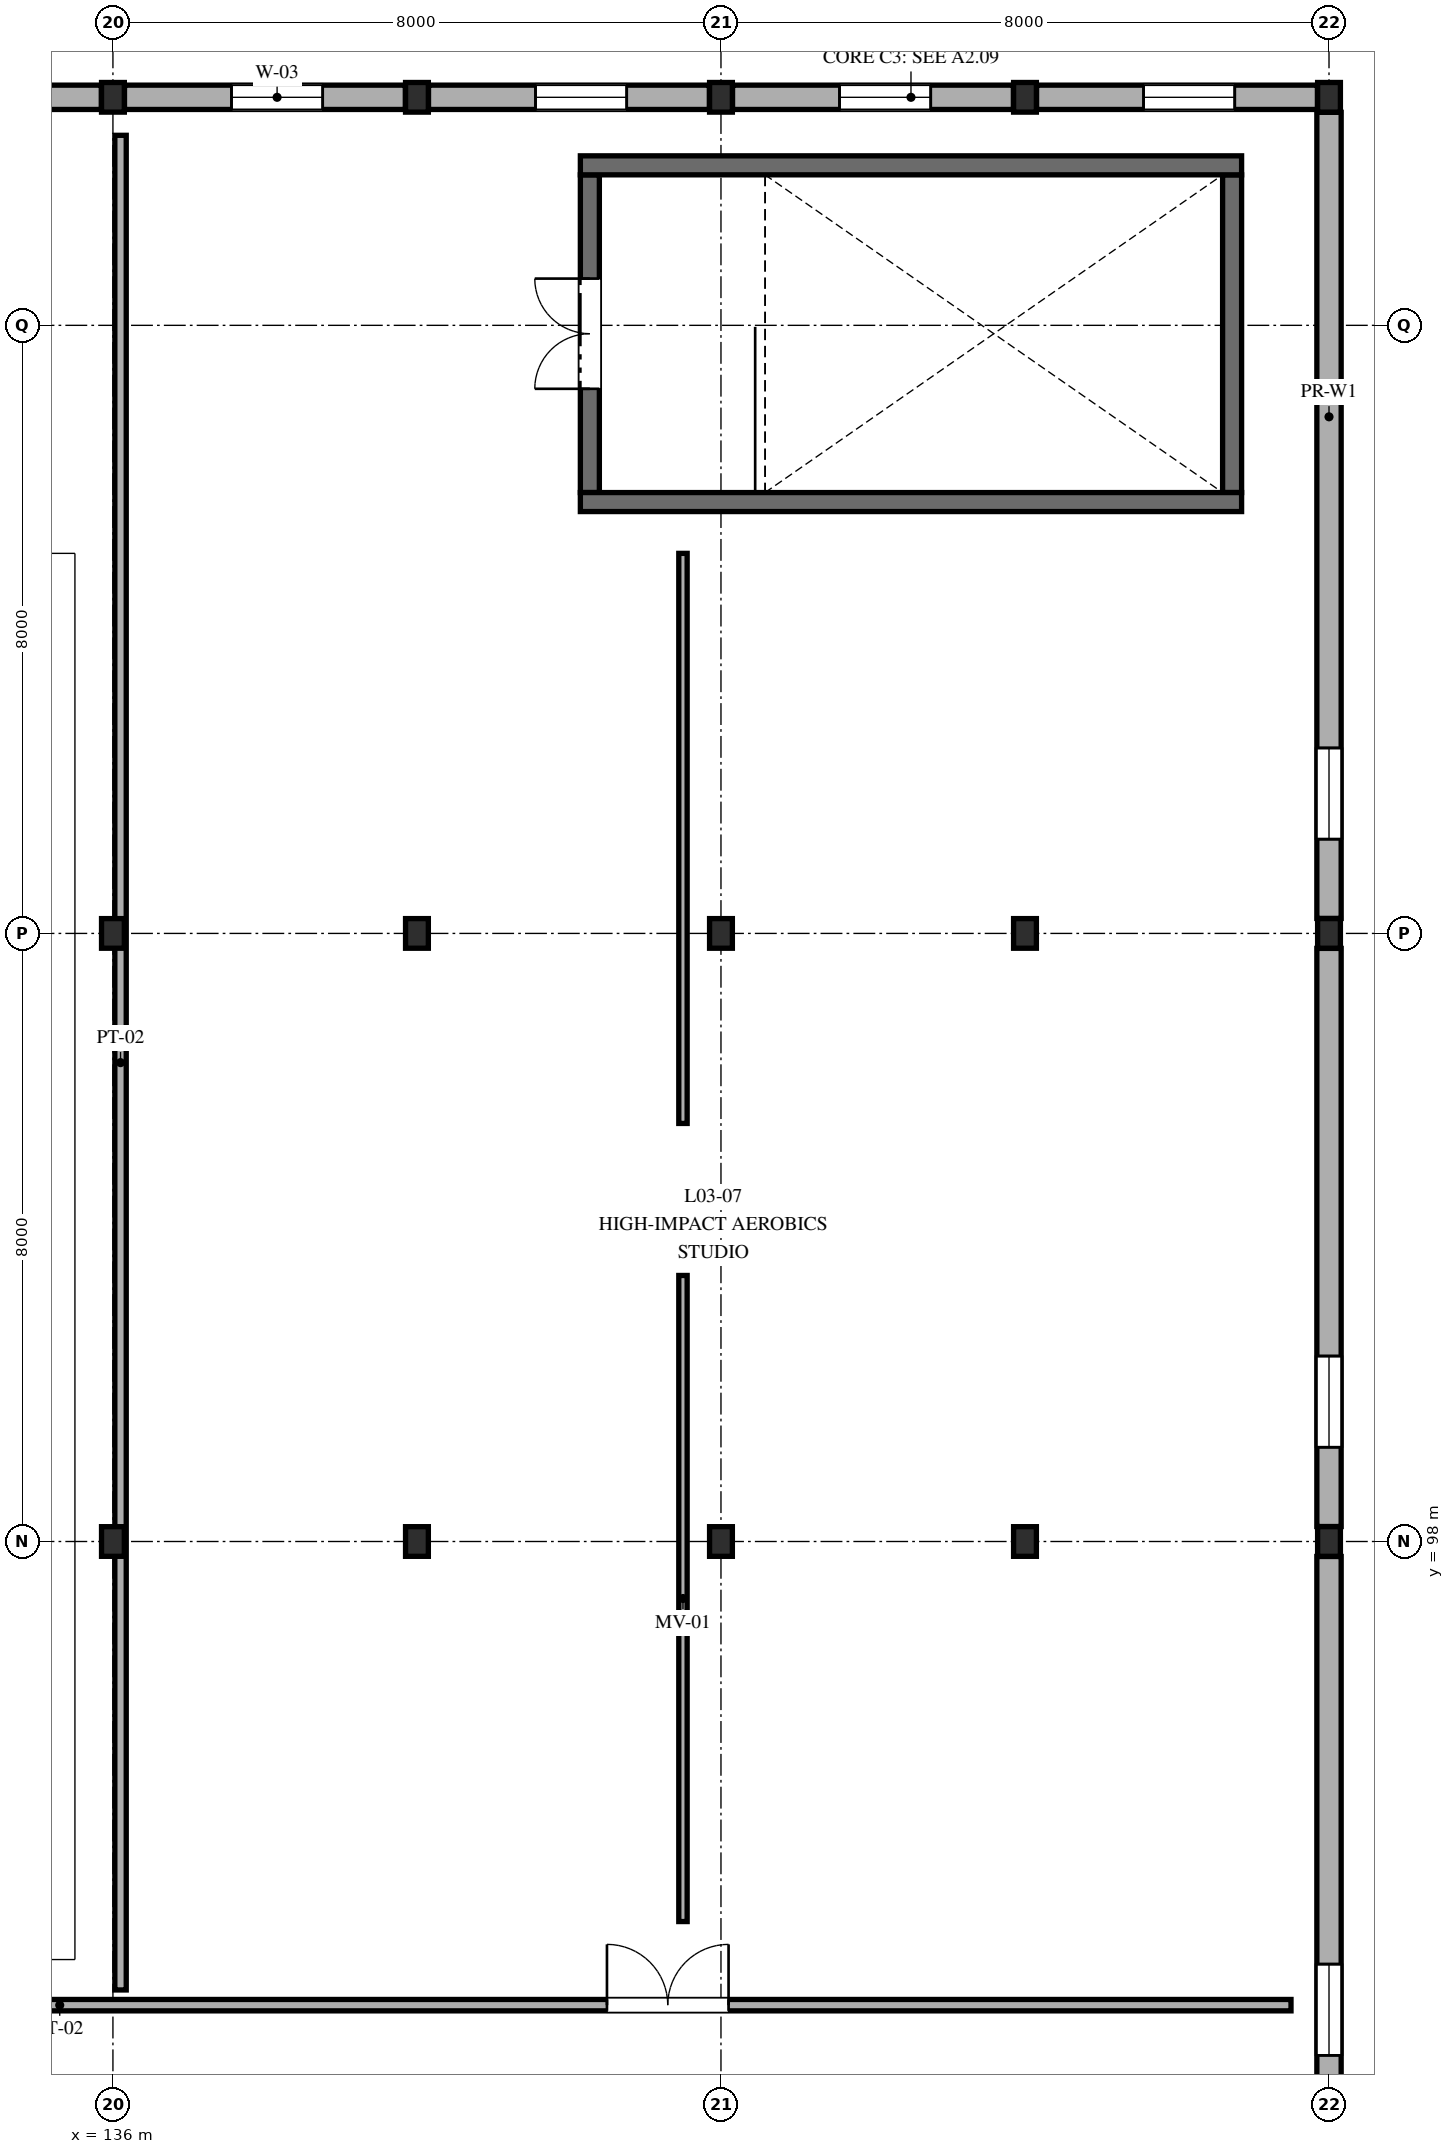
"""IFC4 building model, lengths in metres.
Left out: names, types, materials, properties, quantities, classifications, styles, units other than length and angle.
Written with IfcOpenShell. Run it as: python <this file> out.ifc"""

import sys

from ifc_helpers import new_model, si_unit, direction, frame, frame_2d, origin, origin_2d, place, context, subcontext, project, spatial, rectangle, i_section, extrude, element, fill, save


model = new_model("IFC4")
c1 = context("Model", 3, precision=1e-05, world=origin(), true_north=direction((0.0, 1.0)))
c2 = subcontext(c1, "Body", "Model", "MODEL_VIEW")
j1 = project(units=[si_unit("LENGTHUNIT", "METRE"), si_unit("PLANEANGLEUNIT", "RADIAN")], contexts=[c1])
p1 = place(None, origin())
s1 = spatial("IfcSite", under=j1, at=p1, CompositionType="ELEMENT")
p2 = place(p1, origin())
s2 = spatial("IfcBuilding", under=s1, at=p2, CompositionType="ELEMENT")
p3 = place(p2, frame((0.0, 0.0, 14.0)))
s3 = spatial("IfcBuildingStorey", under=s2, at=p3, CompositionType="ELEMENT", Elevation=14.0)
for number, where, z_axis, x_axis in (
    (1, (136.0, 98.0, 0.0), (0.0, 0.0, 1.0), (1.0, 0.0, 0.0)),
    (2, (136.0, 106.0, 0.0), (0.0, 0.0, 1.0), (1.0, 0.0, 0.0)),
    (3, (136.0, 117.0, 0.0), (0.0, 0.0, 1.0), (1.0, 0.0, 0.0)),
    (4, (140.0, 98.0, 0.0), (0.0, 0.0, 1.0), (1.0, 0.0, 0.0)),
    (5, (140.0, 106.0, 0.0), (0.0, 0.0, 1.0), (1.0, 0.0, 0.0)),
    (6, (140.0, 117.0, 0.0), (0.0, 0.0, 1.0), (1.0, 0.0, 0.0)),
    (7, (144.0, 98.0, 0.0), (0.0, 0.0, 1.0), (1.0, 0.0, 0.0)),
    (8, (144.0, 106.0, 0.0), (0.0, 0.0, 1.0), (1.0, 0.0, 0.0)),
    (9, (144.0, 117.0, 0.0), (0.0, 0.0, 1.0), (1.0, 0.0, 0.0)),
    (10, (148.0, 98.0, 0.0), (0.0, 0.0, 1.0), (1.0, 0.0, 0.0)),
    (11, (148.0, 106.0, 0.0), (0.0, 0.0, 1.0), (1.0, 0.0, 0.0)),
    (12, (148.0, 117.0, 0.0), (0.0, 0.0, 1.0), (1.0, 0.0, 0.0)),
    (13, (152.0, 98.0, 0.0), (0.0, 0.0, 1.0), (1.0, 0.0, 0.0)),
    (14, (152.0, 106.0, 0.0), (0.0, 0.0, 1.0), (1.0, 0.0, 0.0)),
    (15, (152.0, 117.0, 0.0), (0.0, 0.0, 1.0), (1.0, 0.0, 0.0)),
):
    element("IfcColumn", number, at=place(p3, frame(where, z_axis=z_axis, x_axis=x_axis)), inside=s3, PredefinedType="COLUMN", context=c2, shape_type="SweptSolid", body=[
        extrude(i_section(OverallWidth=0.3, OverallDepth=0.39, WebThickness=0.011, FlangeThickness=0.019, FilletRadius=0.027, at=origin_2d()), origin(), (0.0, 0.0, 1.0), 4.6),
    ])
p4 = place(p3, frame((135.848, 117.0, 0.0), z_axis=(0.0, 0.0, 1.0), x_axis=(-1.0, 0.0, 0.0)))
e16 = element("IfcWall", 16, at=p4, inside=s3, PredefinedType="STANDARD", context=c2, shape_type="SweptSolid", body=[
    extrude(rectangle(XDim=3.696, YDim=0.32, at=frame_2d((1.848, 0.0))), origin(), (0.0, 0.0, 1.0), 3.955),
])
p5 = place(p4, frame((1.088, 0.0, 0.95)))
e17 = element("IfcOpeningElement", 17, at=p5, cuts=e16, PredefinedType="OPENING", context=c2, shape_type="SweptSolid", body=[
    extrude(rectangle(XDim=1.2, YDim=1.5, at=frame_2d((0.6, 0.75))), frame((0.0, 0.17, 0.0), z_axis=(0.0, -1.0, 0.0), x_axis=(1.0, 0.0, 0.0)), (0.0, 0.0, 1.0), 0.34),
])
p6 = place(p3, frame((139.848, 117.0, 0.0), z_axis=(0.0, 0.0, 1.0), x_axis=(-1.0, 0.0, 0.0)))
e18 = element("IfcWall", 18, at=p6, inside=s3, PredefinedType="STANDARD", context=c2, shape_type="SweptSolid", body=[
    extrude(rectangle(XDim=3.696, YDim=0.32, at=frame_2d((1.848, 0.0))), origin(), (0.0, 0.0, 1.0), 3.955),
])
p7 = place(p6, frame((1.088, 0.0, 0.95)))
e19 = element("IfcOpeningElement", 19, at=p7, cuts=e18, PredefinedType="OPENING", context=c2, shape_type="SweptSolid", body=[
    extrude(rectangle(XDim=1.2, YDim=1.5, at=frame_2d((0.6, 0.75))), frame((0.0, 0.17, 0.0), z_axis=(0.0, -1.0, 0.0), x_axis=(1.0, 0.0, 0.0)), (0.0, 0.0, 1.0), 0.34),
])
p8 = place(p3, frame((143.848, 117.0, 0.0), z_axis=(0.0, 0.0, 1.0), x_axis=(-1.0, 0.0, 0.0)))
e20 = element("IfcWall", 20, at=p8, inside=s3, PredefinedType="STANDARD", context=c2, shape_type="SweptSolid", body=[
    extrude(rectangle(XDim=3.696, YDim=0.32, at=frame_2d((1.848, 0.0))), origin(), (0.0, 0.0, 1.0), 3.955),
])
p9 = place(p8, frame((1.088, 0.0, 0.95)))
e21 = element("IfcOpeningElement", 21, at=p9, cuts=e20, PredefinedType="OPENING", context=c2, shape_type="SweptSolid", body=[
    extrude(rectangle(XDim=1.2, YDim=1.5, at=frame_2d((0.6, 0.75))), frame((0.0, 0.17, 0.0), z_axis=(0.0, -1.0, 0.0), x_axis=(1.0, 0.0, 0.0)), (0.0, 0.0, 1.0), 0.34),
])
p10 = place(p3, frame((147.848, 117.0, 0.0), z_axis=(0.0, 0.0, 1.0), x_axis=(-1.0, 0.0, 0.0)))
e22 = element("IfcWall", 22, at=p10, inside=s3, PredefinedType="STANDARD", context=c2, shape_type="SweptSolid", body=[
    extrude(rectangle(XDim=3.696, YDim=0.32, at=frame_2d((1.848, 0.0))), origin(), (0.0, 0.0, 1.0), 3.955),
])
p11 = place(p10, frame((1.088, 0.0, 0.95)))
e23 = element("IfcOpeningElement", 23, at=p11, cuts=e22, PredefinedType="OPENING", context=c2, shape_type="SweptSolid", body=[
    extrude(rectangle(XDim=1.2, YDim=1.5, at=frame_2d((0.6, 0.75))), frame((0.0, 0.17, 0.0), z_axis=(0.0, -1.0, 0.0), x_axis=(1.0, 0.0, 0.0)), (0.0, 0.0, 1.0), 0.34),
])
p12 = place(p3, frame((151.848, 117.0, 0.0), z_axis=(0.0, 0.0, 1.0), x_axis=(-1.0, 0.0, 0.0)))
e24 = element("IfcWall", 24, at=p12, inside=s3, PredefinedType="STANDARD", context=c2, shape_type="SweptSolid", body=[
    extrude(rectangle(XDim=3.696, YDim=0.32, at=frame_2d((1.848, 0.0))), origin(), (0.0, 0.0, 1.0), 3.955),
])
p13 = place(p12, frame((1.088, 0.0, 0.95)))
e25 = element("IfcOpeningElement", 25, at=p13, cuts=e24, PredefinedType="OPENING", context=c2, shape_type="SweptSolid", body=[
    extrude(rectangle(XDim=1.2, YDim=1.5, at=frame_2d((0.6, 0.75))), frame((0.0, 0.17, 0.0), z_axis=(0.0, -1.0, 0.0), x_axis=(1.0, 0.0, 0.0)), (0.0, 0.0, 1.0), 0.34),
])
p14 = place(p3, frame((152.0, 90.197, 0.0), z_axis=(0.0, 0.0, 1.0), x_axis=(0.0, 1.0, 0.0)))
e26 = element("IfcWall", 26, at=p14, inside=s3, PredefinedType="STANDARD", context=c2, shape_type="SweptSolid", body=[
    extrude(rectangle(XDim=7.606, YDim=0.32, at=frame_2d((3.803, 0.0))), origin(), (0.0, 0.0, 1.0), 4.005),
])
p15 = place(p14, frame((1.043, 0.0, 0.95)))
e27 = element("IfcOpeningElement", 27, at=p15, cuts=e26, PredefinedType="OPENING", context=c2, shape_type="SweptSolid", body=[
    extrude(rectangle(XDim=1.2, YDim=1.5, at=frame_2d((0.6, 0.75))), frame((0.0, 0.17, 0.0), z_axis=(0.0, -1.0, 0.0), x_axis=(1.0, 0.0, 0.0)), (0.0, 0.0, 1.0), 0.34),
])
p16 = place(p3, frame((152.0, 98.197, 0.0), z_axis=(0.0, 0.0, 1.0), x_axis=(0.0, 1.0, 0.0)))
e28 = element("IfcWall", 28, at=p16, inside=s3, PredefinedType="STANDARD", context=c2, shape_type="SweptSolid", body=[
    extrude(rectangle(XDim=7.606, YDim=0.32, at=frame_2d((3.803, 0.0))), origin(), (0.0, 0.0, 1.0), 4.005),
])
p17 = place(p16, frame((1.043, 0.0, 0.95)))
e29 = element("IfcOpeningElement", 29, at=p17, cuts=e28, PredefinedType="OPENING", context=c2, shape_type="SweptSolid", body=[
    extrude(rectangle(XDim=1.2, YDim=1.5, at=frame_2d((0.6, 0.75))), frame((0.0, 0.17, 0.0), z_axis=(0.0, -1.0, 0.0), x_axis=(1.0, 0.0, 0.0)), (0.0, 0.0, 1.0), 0.34),
])
p18 = place(p3, frame((152.0, 106.197, 0.0), z_axis=(0.0, 0.0, 1.0), x_axis=(0.0, 1.0, 0.0)))
e30 = element("IfcWall", 30, at=p18, inside=s3, PredefinedType="STANDARD", context=c2, shape_type="SweptSolid", body=[
    extrude(rectangle(XDim=10.606, YDim=0.32, at=frame_2d((5.303, 0.0))), origin(), (0.0, 0.0, 1.0), 4.005),
])
p19 = place(p18, frame((1.043, 0.0, 0.95)))
e31 = element("IfcOpeningElement", 31, at=p19, cuts=e30, PredefinedType="OPENING", context=c2, shape_type="SweptSolid", body=[
    extrude(rectangle(XDim=1.2, YDim=1.5, at=frame_2d((0.6, 0.75))), frame((0.0, 0.17, 0.0), z_axis=(0.0, -1.0, 0.0), x_axis=(1.0, 0.0, 0.0)), (0.0, 0.0, 1.0), 0.34),
])
p20 = place(p3, frame((142.275, 111.8, 0.0), z_axis=(0.0, 0.0, 1.0), x_axis=(0.0, 1.0, 0.0)))
e32 = element("IfcWall", 32, at=p20, inside=s3, PredefinedType="SHEAR", context=c2, shape_type="SweptSolid", body=[
    extrude(rectangle(XDim=4.18, YDim=0.25, at=frame_2d((2.09, 0.0))), origin(), (0.0, 0.0, 1.0), 4.6),
])
p21 = place(p20, frame((1.365, 0.0, 0.0)))
e33 = element("IfcOpeningElement", 33, at=p21, cuts=e32, PredefinedType="OPENING", context=c2, shape_type="SweptSolid", body=[
    extrude(rectangle(XDim=1.45, YDim=2.2, at=frame_2d((0.725, 1.1))), frame((0.0, 0.135, 0.0), z_axis=(0.0, -1.0, 0.0), x_axis=(1.0, 0.0, 0.0)), (0.0, 0.0, 1.0), 0.27),
])
p22 = place(p3, frame((150.725, 115.98, 0.0), z_axis=(0.0, 0.0, 1.0), x_axis=(0.0, -1.0, 0.0)))
e34 = element("IfcWall", 34, at=p22, inside=s3, PredefinedType="SHEAR", context=c2, shape_type="SweptSolid", body=[
    extrude(rectangle(XDim=4.18, YDim=0.25, at=frame_2d((2.09, 0.0))), origin(), (0.0, 0.0, 1.0), 4.6),
])
for number, where, z_axis, x_axis in (
    (35, (142.15, 111.675, 0.0), (0.0, 0.0, 1.0), (1.0, 0.0, 0.0)),
    (36, (150.85, 116.105, 0.0), (0.0, 0.0, 1.0), (-1.0, 0.0, 0.0)),
):
    element("IfcWall", number, at=place(p3, frame(where, z_axis=z_axis, x_axis=x_axis)), inside=s3, PredefinedType="SHEAR", context=c2, shape_type="SweptSolid", body=[
        extrude(rectangle(XDim=8.7, YDim=0.25, at=frame_2d((4.35, 0.0))), origin(), (0.0, 0.0, 1.0), 4.6),
    ])
p23 = place(p3, frame((104.5, 91.9, 0.0), z_axis=(0.0, 0.0, 1.0), x_axis=(1.0, 0.0, 0.0)))
e37 = element("IfcWall", 37, at=p23, inside=s3, PredefinedType="PARTITIONING", context=c2, shape_type="SweptSolid", body=[
    extrude(rectangle(XDim=47.0, YDim=0.15, at=frame_2d((23.5, 0.0))), origin(), (0.0, 0.0, 1.0), 3.85),
])
p24 = place(p23, frame((2.5, 0.0, 0.0)))
e38 = element("IfcOpeningElement", 38, at=p24, cuts=e37, PredefinedType="OPENING", context=c2, shape_type="SweptSolid", body=[
    extrude(rectangle(XDim=1.1, YDim=2.2, at=frame_2d((0.55, 1.1))), frame((0.0, 0.085, 0.0), z_axis=(0.0, -1.0, 0.0), x_axis=(1.0, 0.0, 0.0)), (0.0, 0.0, 1.0), 0.17),
])
p25 = place(p23, frame((9.5, 0.0, 0.0)))
e39 = element("IfcOpeningElement", 39, at=p25, cuts=e37, PredefinedType="OPENING", context=c2, shape_type="SweptSolid", body=[
    extrude(rectangle(XDim=1.05, YDim=2.15, at=frame_2d((0.525, 1.075))), frame((0.0, 0.085, 0.0), z_axis=(0.0, -1.0, 0.0), x_axis=(1.0, 0.0, 0.0)), (0.0, 0.0, 1.0), 0.17),
])
p26 = place(p23, frame((12.5, 0.0, 0.0)))
e40 = element("IfcOpeningElement", 40, at=p26, cuts=e37, PredefinedType="OPENING", context=c2, shape_type="SweptSolid", body=[
    extrude(rectangle(XDim=1.6, YDim=2.2, at=frame_2d((0.8, 1.1))), frame((0.0, 0.085, 0.0), z_axis=(0.0, -1.0, 0.0), x_axis=(1.0, 0.0, 0.0)), (0.0, 0.0, 1.0), 0.17),
])
p27 = place(p23, frame((22.0, 0.0, 0.0)))
e41 = element("IfcOpeningElement", 41, at=p27, cuts=e37, PredefinedType="OPENING", context=c2, shape_type="SweptSolid", body=[
    extrude(rectangle(XDim=1.6, YDim=2.2, at=frame_2d((0.8, 1.1))), frame((0.0, 0.085, 0.0), z_axis=(0.0, -1.0, 0.0), x_axis=(1.0, 0.0, 0.0)), (0.0, 0.0, 1.0), 0.17),
])
p28 = place(p23, frame((38.0, 0.0, 0.0)))
e42 = element("IfcOpeningElement", 42, at=p28, cuts=e37, PredefinedType="OPENING", context=c2, shape_type="SweptSolid", body=[
    extrude(rectangle(XDim=1.6, YDim=2.2, at=frame_2d((0.8, 1.1))), frame((0.0, 0.085, 0.0), z_axis=(0.0, -1.0, 0.0), x_axis=(1.0, 0.0, 0.0)), (0.0, 0.0, 1.0), 0.17),
])
p29 = place(p3, frame((136.1, 92.1, 0.0), z_axis=(0.0, 0.0, 1.0), x_axis=(0.0, 1.0, 0.0)))
e43 = element("IfcWall", 43, at=p29, inside=s3, PredefinedType="PARTITIONING", context=c2, shape_type="SweptSolid", body=[
    extrude(rectangle(XDim=24.4, YDim=0.15, at=frame_2d((12.2, 0.0))), origin(), (0.0, 0.0, 1.0), 3.85),
])
p30 = place(p3, frame((143.5, 93.0, 0.0), z_axis=(0.0, 0.0, 1.0), x_axis=(0.0, 1.0, 0.0)))
e44 = element("IfcWall", 44, at=p30, inside=s3, PredefinedType="MOVABLE", context=c2, shape_type="SweptSolid", body=[
    extrude(rectangle(XDim=8.5, YDim=0.11, at=frame_2d((4.25, 0.0))), origin(), (0.0, 0.0, 1.0), 3.7),
])
p31 = place(p3, frame((143.5, 103.5, 0.0), z_axis=(0.0, 0.0, 1.0), x_axis=(0.0, 1.0, 0.0)))
e45 = element("IfcWall", 45, at=p31, inside=s3, PredefinedType="MOVABLE", context=c2, shape_type="SweptSolid", body=[
    extrude(rectangle(XDim=7.5, YDim=0.11, at=frame_2d((3.75, 0.0))), origin(), (0.0, 0.0, 1.0), 3.7),
])
p32 = place(p7, origin())
e46 = element("IfcWindow", 46, at=p32, inside=s3, PartitioningType="SINGLE_PANEL", PredefinedType="WINDOW", context=c2, shape_type="SweptSolid", body=[
    extrude(rectangle(XDim=1.2, YDim=1.5, at=frame_2d((0.6, 0.75))), frame((0.0, 0.03, 0.0), z_axis=(0.0, -1.0, 0.0), x_axis=(1.0, 0.0, 0.0)), (0.0, 0.0, 1.0), 0.06),
])
fill(e19, e46)
p33 = place(p9, origin())
e47 = element("IfcWindow", 47, at=p33, inside=s3, PartitioningType="SINGLE_PANEL", PredefinedType="WINDOW", context=c2, shape_type="SweptSolid", body=[
    extrude(rectangle(XDim=1.2, YDim=1.5, at=frame_2d((0.6, 0.75))), frame((0.0, 0.03, 0.0), z_axis=(0.0, -1.0, 0.0), x_axis=(1.0, 0.0, 0.0)), (0.0, 0.0, 1.0), 0.06),
])
fill(e21, e47)
p34 = place(p11, origin())
e48 = element("IfcWindow", 48, at=p34, inside=s3, PartitioningType="SINGLE_PANEL", PredefinedType="WINDOW", context=c2, shape_type="SweptSolid", body=[
    extrude(rectangle(XDim=1.2, YDim=1.5, at=frame_2d((0.6, 0.75))), frame((0.0, 0.03, 0.0), z_axis=(0.0, -1.0, 0.0), x_axis=(1.0, 0.0, 0.0)), (0.0, 0.0, 1.0), 0.06),
])
fill(e23, e48)
p35 = place(p13, origin())
e49 = element("IfcWindow", 49, at=p35, inside=s3, PartitioningType="SINGLE_PANEL", PredefinedType="WINDOW", context=c2, shape_type="SweptSolid", body=[
    extrude(rectangle(XDim=1.2, YDim=1.5, at=frame_2d((0.6, 0.75))), frame((0.0, 0.03, 0.0), z_axis=(0.0, -1.0, 0.0), x_axis=(1.0, 0.0, 0.0)), (0.0, 0.0, 1.0), 0.06),
])
fill(e25, e49)
p36 = place(p15, origin())
e50 = element("IfcWindow", 50, at=p36, inside=s3, PartitioningType="SINGLE_PANEL", PredefinedType="WINDOW", context=c2, shape_type="SweptSolid", body=[
    extrude(rectangle(XDim=1.2, YDim=1.5, at=frame_2d((0.6, 0.75))), frame((0.0, 0.03, 0.0), z_axis=(0.0, -1.0, 0.0), x_axis=(1.0, 0.0, 0.0)), (0.0, 0.0, 1.0), 0.06),
])
fill(e27, e50)
p37 = place(p17, origin())
e51 = element("IfcWindow", 51, at=p37, inside=s3, PartitioningType="SINGLE_PANEL", PredefinedType="WINDOW", context=c2, shape_type="SweptSolid", body=[
    extrude(rectangle(XDim=1.2, YDim=1.5, at=frame_2d((0.6, 0.75))), frame((0.0, 0.03, 0.0), z_axis=(0.0, -1.0, 0.0), x_axis=(1.0, 0.0, 0.0)), (0.0, 0.0, 1.0), 0.06),
])
fill(e29, e51)
p38 = place(p19, origin())
e52 = element("IfcWindow", 52, at=p38, inside=s3, PartitioningType="SINGLE_PANEL", PredefinedType="WINDOW", context=c2, shape_type="SweptSolid", body=[
    extrude(rectangle(XDim=1.2, YDim=1.5, at=frame_2d((0.6, 0.75))), frame((0.0, 0.03, 0.0), z_axis=(0.0, -1.0, 0.0), x_axis=(1.0, 0.0, 0.0)), (0.0, 0.0, 1.0), 0.06),
])
fill(e31, e52)
p39 = place(p21, origin())
e53 = element("IfcDoor", 53, at=p39, inside=s3, OperationType="DOUBLE_DOOR_SINGLE_SWING", PredefinedType="DOOR", context=c2, shape_type="SweptSolid", body=[
    extrude(rectangle(XDim=1.45, YDim=2.2, at=frame_2d((0.725, 1.1))), frame((0.0, 0.025, 0.0), z_axis=(0.0, -1.0, 0.0), x_axis=(1.0, 0.0, 0.0)), (0.0, 0.0, 1.0), 0.05),
])
fill(e33, e53)
p40 = place(p28, origin())
e54 = element("IfcDoor", 54, at=p40, inside=s3, OperationType="DOUBLE_DOOR_SINGLE_SWING", PredefinedType="DOOR", context=c2, shape_type="SweptSolid", body=[
    extrude(rectangle(XDim=1.6, YDim=2.2, at=frame_2d((0.8, 1.1))), frame((0.0, 0.025, 0.0), z_axis=(0.0, -1.0, 0.0), x_axis=(1.0, 0.0, 0.0)), (0.0, 0.0, 1.0), 0.05),
])
fill(e42, e54)
save(model, sys.argv[1])
